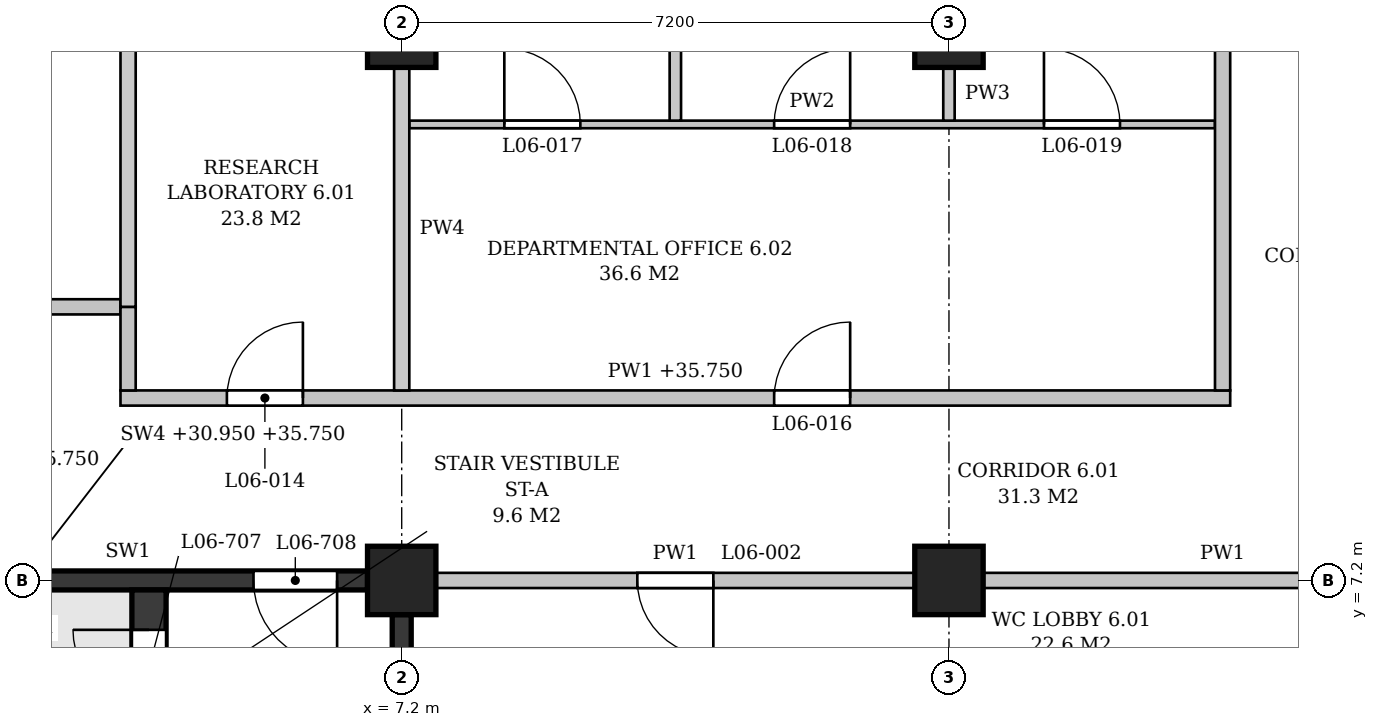
"""IFC4 building model, lengths in metres.
Left out: names, types, materials, properties, quantities, classifications, styles, units other than length and angle.
Written with IfcOpenShell. Run it as: python <this file> out.ifc"""

import sys

from ifc_helpers import new_model, si_unit, direction, frame, frame_2d, origin, origin_2d, place, context, subcontext, project, spatial, polyline, rectangle, outline, extrude, element, fill, save


model = new_model("IFC4")
c1 = context("Model", 3, precision=1e-05, world=origin(), true_north=direction((0.0, 1.0)))
c2 = subcontext(c1, "Body", "Model", "MODEL_VIEW")
j1 = project(units=[si_unit("LENGTHUNIT", "METRE"), si_unit("PLANEANGLEUNIT", "RADIAN")], contexts=[c1])
p1 = place(None, origin())
s1 = spatial("IfcSite", under=j1, at=p1, CompositionType="ELEMENT")
p2 = place(p1, origin())
s2 = spatial("IfcBuilding", under=s1, at=p2, CompositionType="ELEMENT")
p3 = place(p2, frame((0.0, 0.0, 31.2)))
s3 = spatial("IfcBuildingStorey", under=s2, at=p3, CompositionType="ELEMENT", Elevation=31.2)
for number, where, z_axis, x_axis in (
    (1, (7.2, 7.2, 0.0), (0.0, 0.0, 1.0), (1.0, 0.0, 0.0)),
    (2, (7.2, 14.4, 0.0), (0.0, 0.0, 1.0), (1.0, 0.0, 0.0)),
    (3, (14.4, 7.2, 0.0), (0.0, 0.0, 1.0), (1.0, 0.0, 0.0)),
    (4, (14.4, 14.4, 0.0), (0.0, 0.0, 1.0), (1.0, 0.0, 0.0)),
):
    element("IfcColumn", number, at=place(p3, frame(where, z_axis=z_axis, x_axis=x_axis)), inside=s3, PredefinedType="COLUMN", context=c2, shape_type="SweptSolid", body=[
        extrude(rectangle(XDim=0.9, YDim=0.9, at=origin_2d()), origin(), (0.0, 0.0, 1.0), 4.8),
    ])
p4 = place(p3, frame((0.45, 7.2, 0.0), z_axis=(0.0, 0.0, 1.0), x_axis=(1.0, 0.0, 0.0)))
e5 = element("IfcWall", 5, at=p4, inside=s3, PredefinedType="SHEAR", context=c2, shape_type="SweptSolid", body=[
    extrude(rectangle(XDim=6.3, YDim=0.25, at=frame_2d((3.15, 0.0))), origin(), (0.0, 0.0, 1.0), 3.8),
])
p5 = place(p4, frame((4.8, 0.0, 0.0)))
e6 = element("IfcOpeningElement", 6, at=p5, cuts=e5, PredefinedType="OPENING", context=c2, shape_type="SweptSolid", body=[
    extrude(rectangle(XDim=1.1, YDim=2.1, at=frame_2d((0.55, 1.05))), frame((0.0, 0.135, 0.0), z_axis=(0.0, -1.0, 0.0), x_axis=(1.0, 0.0, 0.0)), (0.0, 0.0, 1.0), 0.27),
])
p6 = place(p3, frame((7.2, 0.45, 0.0), z_axis=(0.0, 0.0, 1.0), x_axis=(0.0, 1.0, 0.0)))
e7 = element("IfcWall", 7, at=p6, inside=s3, PredefinedType="SHEAR", context=c2, shape_type="SweptSolid", body=[
    extrude(rectangle(XDim=6.3, YDim=0.25, at=frame_2d((3.15, 0.0))), origin(), (0.0, 0.0, 1.0), 3.8),
])
p7 = place(p3, frame((3.875, 0.225, 0.0), z_axis=(0.0, 0.0, 1.0), x_axis=(0.0, 1.0, 0.0)))
e8 = element("IfcWall", 8, at=p7, inside=s3, PredefinedType="SHEAR", context=c2, shape_type="SweptSolid", body=[
    extrude(rectangle(XDim=6.85, YDim=0.45, at=frame_2d((3.425, 0.0))), origin(), (0.0, 0.0, 1.0), 4.55),
])
p8 = place(p7, frame((5.325, 0.0, 0.0)))
e9 = element("IfcOpeningElement", 9, at=p8, cuts=e8, PredefinedType="OPENING", context=c2, shape_type="SweptSolid", body=[
    extrude(rectangle(XDim=1.0, YDim=2.1, at=frame_2d((0.5, 1.05))), frame((0.0, 0.235, 0.0), z_axis=(0.0, -1.0, 0.0), x_axis=(1.0, 0.0, 0.0)), (0.0, 0.0, 1.0), 0.47),
])
p9 = place(p3, frame((7.65, 7.2, 0.0), z_axis=(0.0, 0.0, 1.0), x_axis=(1.0, 0.0, 0.0)))
e10 = element("IfcWall", 10, at=p9, inside=s3, PredefinedType="PARTITIONING", context=c2, shape_type="SweptSolid", body=[
    extrude(rectangle(XDim=6.3, YDim=0.2, at=frame_2d((3.15, 0.0))), origin(), (0.0, 0.0, 1.0), 3.8),
])
p10 = place(p9, frame((2.65, 0.0, 0.0)))
e11 = element("IfcOpeningElement", 11, at=p10, cuts=e10, PredefinedType="OPENING", context=c2, shape_type="SweptSolid", body=[
    extrude(rectangle(XDim=1.0, YDim=2.1, at=frame_2d((0.5, 1.05))), frame((0.0, 0.11, 0.0), z_axis=(0.0, -1.0, 0.0), x_axis=(1.0, 0.0, 0.0)), (0.0, 0.0, 1.0), 0.22),
])
p11 = place(p3, frame((14.85, 7.2, 0.0), z_axis=(0.0, 0.0, 1.0), x_axis=(1.0, 0.0, 0.0)))
e12 = element("IfcWall", 12, at=p11, inside=s3, PredefinedType="PARTITIONING", context=c2, shape_type="SweptSolid", body=[
    extrude(rectangle(XDim=6.3, YDim=0.2, at=frame_2d((3.15, 0.0))), origin(), (0.0, 0.0, 1.0), 3.8),
])
p12 = place(p11, frame((4.225, 0.0, 0.0)))
e13 = element("IfcOpeningElement", 13, at=p12, cuts=e12, PredefinedType="OPENING", context=c2, shape_type="SweptSolid", body=[
    extrude(rectangle(XDim=1.0, YDim=2.1, at=frame_2d((0.5, 1.05))), frame((0.0, 0.11, 0.0), z_axis=(0.0, -1.0, 0.0), x_axis=(1.0, 0.0, 0.0)), (0.0, 0.0, 1.0), 0.22),
])
p13 = place(p3, frame((3.5, 9.6, 0.0), z_axis=(0.0, 0.0, 1.0), x_axis=(1.0, 0.0, 0.0)))
e14 = element("IfcWall", 14, at=p13, inside=s3, PredefinedType="PARTITIONING", context=c2, shape_type="SweptSolid", body=[
    extrude(outline(polyline([(0.0, 0.0), (14.6, 0.0), (14.6, 4.55), (11.15, 4.55), (11.15, 3.8), (10.65, 3.8), (10.65, 4.55), (3.95, 4.55), (3.95, 3.8), (3.45, 3.8), (3.45, 4.55), (0.0, 4.55), (0.0, 0.0)])), frame((0.0, 0.1, 0.0), z_axis=(0.0, -1.0, 0.0), x_axis=(1.0, 0.0, 0.0)), (0.0, 0.0, 1.0), 0.2),
])
p14 = place(p13, frame((1.4, 0.0, 0.0)))
e15 = element("IfcOpeningElement", 15, at=p14, cuts=e14, PredefinedType="OPENING", context=c2, shape_type="SweptSolid", body=[
    extrude(rectangle(XDim=1.0, YDim=2.1, at=frame_2d((0.5, 1.05))), frame((0.0, 0.11, 0.0), z_axis=(0.0, -1.0, 0.0), x_axis=(1.0, 0.0, 0.0)), (0.0, 0.0, 1.0), 0.22),
])
p15 = place(p13, frame((8.6, 0.0, 0.0)))
e16 = element("IfcOpeningElement", 16, at=p15, cuts=e14, PredefinedType="OPENING", context=c2, shape_type="SweptSolid", body=[
    extrude(rectangle(XDim=1.0, YDim=2.1, at=frame_2d((0.5, 1.05))), frame((0.0, 0.11, 0.0), z_axis=(0.0, -1.0, 0.0), x_axis=(1.0, 0.0, 0.0)), (0.0, 0.0, 1.0), 0.22),
])
p16 = place(p3, frame((0.15, 10.8, 0.0), z_axis=(0.0, 0.0, 1.0), x_axis=(1.0, 0.0, 0.0)))
e17 = element("IfcWall", 17, at=p16, inside=s3, PredefinedType="PARTITIONING", context=c2, shape_type="SweptSolid", body=[
    extrude(outline(polyline([(0.0, 0.0), (3.35, 0.0), (3.35, 4.55), (0.1, 4.55), (0.1, 3.95), (0.0, 3.95), (0.0, 0.0)])), frame((0.0, 0.1, 0.0), z_axis=(0.0, -1.0, 0.0), x_axis=(1.0, 0.0, 0.0)), (0.0, 0.0, 1.0), 0.2),
])
p17 = place(p16, frame((1.175, 0.0, 0.0)))
e18 = element("IfcOpeningElement", 18, at=p17, cuts=e17, PredefinedType="OPENING", context=c2, shape_type="SweptSolid", body=[
    extrude(rectangle(XDim=1.0, YDim=2.1, at=frame_2d((0.5, 1.05))), frame((0.0, 0.11, 0.0), z_axis=(0.0, -1.0, 0.0), x_axis=(1.0, 0.0, 0.0)), (0.0, 0.0, 1.0), 0.22),
])
p18 = place(p3, frame((7.3, 13.2, 0.0), z_axis=(0.0, 0.0, 1.0), x_axis=(1.0, 0.0, 0.0)))
e19 = element("IfcWall", 19, at=p18, inside=s3, PredefinedType="PARTITIONING", context=c2, shape_type="SweptSolid", body=[
    extrude(rectangle(XDim=10.6, YDim=0.1, at=frame_2d((5.3, 0.0))), origin(), (0.0, 0.0, 1.0), 3.8),
])
p19 = place(p18, frame((1.25, 0.0, 0.0)))
e20 = element("IfcOpeningElement", 20, at=p19, cuts=e19, PredefinedType="OPENING", context=c2, shape_type="SweptSolid", body=[
    extrude(rectangle(XDim=1.0, YDim=2.1, at=frame_2d((0.5, 1.05))), frame((0.0, 0.06, 0.0), z_axis=(0.0, -1.0, 0.0), x_axis=(1.0, 0.0, 0.0)), (0.0, 0.0, 1.0), 0.12),
])
p20 = place(p18, frame((4.8, 0.0, 0.0)))
e21 = element("IfcOpeningElement", 21, at=p20, cuts=e19, PredefinedType="OPENING", context=c2, shape_type="SweptSolid", body=[
    extrude(rectangle(XDim=1.0, YDim=2.1, at=frame_2d((0.5, 1.05))), frame((0.0, 0.06, 0.0), z_axis=(0.0, -1.0, 0.0), x_axis=(1.0, 0.0, 0.0)), (0.0, 0.0, 1.0), 0.12),
])
p21 = place(p18, frame((8.35, 0.0, 0.0)))
e22 = element("IfcOpeningElement", 22, at=p21, cuts=e19, PredefinedType="OPENING", context=c2, shape_type="SweptSolid", body=[
    extrude(rectangle(XDim=1.0, YDim=2.1, at=frame_2d((0.5, 1.05))), frame((0.0, 0.06, 0.0), z_axis=(0.0, -1.0, 0.0), x_axis=(1.0, 0.0, 0.0)), (0.0, 0.0, 1.0), 0.12),
])
p22 = place(p3, frame((3.6, 9.7, 0.0), z_axis=(0.0, 0.0, 1.0), x_axis=(0.0, 1.0, 0.0)))
e23 = element("IfcWall", 23, at=p22, inside=s3, PredefinedType="PARTITIONING", context=c2, shape_type="SweptSolid", body=[
    extrude(rectangle(XDim=1.1, YDim=0.2, at=frame_2d((0.55, 0.0))), origin(), (0.0, 0.0, 1.0), 4.55),
])
p23 = place(p3, frame((3.6, 10.8, 0.0), z_axis=(0.0, 0.0, 1.0), x_axis=(0.0, 1.0, 0.0)))
e24 = element("IfcWall", 24, at=p23, inside=s3, PredefinedType="PARTITIONING", context=c2, shape_type="SweptSolid", body=[
    extrude(outline(polyline([(0.0, 0.0), (10.65, 0.0), (10.65, 3.95), (10.55, 3.95), (10.55, 4.55), (3.85, 4.55), (3.85, 3.8), (3.35, 3.8), (3.35, 4.55), (0.0, 4.55), (0.0, 0.0)])), frame((0.0, 0.1, 0.0), z_axis=(0.0, -1.0, 0.0), x_axis=(1.0, 0.0, 0.0)), (0.0, 0.0, 1.0), 0.2),
])
p24 = place(p3, frame((7.2, 9.7, 0.0), z_axis=(0.0, 0.0, 1.0), x_axis=(0.0, 1.0, 0.0)))
e25 = element("IfcWall", 25, at=p24, inside=s3, PredefinedType="PARTITIONING", context=c2, shape_type="SweptSolid", body=[
    extrude(rectangle(XDim=4.25, YDim=0.2, at=frame_2d((2.125, 0.0))), origin(), (0.0, 0.0, 1.0), 3.8),
])
p25 = place(p3, frame((10.8, 13.25, 0.0), z_axis=(0.0, 0.0, 1.0), x_axis=(0.0, 1.0, 0.0)))
e26 = element("IfcWall", 26, at=p25, inside=s3, PredefinedType="PARTITIONING", context=c2, shape_type="SweptSolid", body=[
    extrude(rectangle(XDim=8.2, YDim=0.15, at=frame_2d((4.1, 0.0))), origin(), (0.0, 0.0, 1.0), 3.8),
])
p26 = place(p3, frame((14.4, 13.25, 0.0), z_axis=(0.0, 0.0, 1.0), x_axis=(0.0, 1.0, 0.0)))
e27 = element("IfcWall", 27, at=p26, inside=s3, PredefinedType="PARTITIONING", context=c2, shape_type="SweptSolid", body=[
    extrude(rectangle(XDim=0.7, YDim=0.15, at=frame_2d((0.35, 0.0))), origin(), (0.0, 0.0, 1.0), 3.8),
])
p27 = place(p3, frame((18.0, 9.7, 0.0), z_axis=(0.0, 0.0, 1.0), x_axis=(0.0, 1.0, 0.0)))
e28 = element("IfcWall", 28, at=p27, inside=s3, PredefinedType="PARTITIONING", context=c2, shape_type="SweptSolid", body=[
    extrude(outline(polyline([(0.0, 0.0), (7.1, 0.0), (7.1, 4.55), (4.95, 4.55), (4.95, 3.8), (4.45, 3.8), (4.45, 4.55), (0.0, 4.55), (0.0, 0.0)])), frame((0.0, 0.1, 0.0), z_axis=(0.0, -1.0, 0.0), x_axis=(1.0, 0.0, 0.0)), (0.0, 0.0, 1.0), 0.2),
])
p28 = place(p8, origin())
e29 = element("IfcDoor", 29, at=p28, inside=s3, OperationType="SINGLE_SWING_RIGHT", PredefinedType="DOOR", context=c2, shape_type="SweptSolid", body=[
    extrude(rectangle(XDim=1.0, YDim=2.1, at=frame_2d((0.5, 1.05))), frame((0.0, 0.025, 0.0), z_axis=(0.0, -1.0, 0.0), x_axis=(1.0, 0.0, 0.0)), (0.0, 0.0, 1.0), 0.05),
])
fill(e9, e29)
p29 = place(p5, frame((1.1, 0.0, 0.0), z_axis=(0.0, 0.0, 1.0), x_axis=(-1.0, 0.0, 0.0)))
e30 = element("IfcDoor", 30, at=p29, inside=s3, OperationType="SINGLE_SWING_LEFT", PredefinedType="DOOR", context=c2, shape_type="SweptSolid", body=[
    extrude(rectangle(XDim=1.1, YDim=2.1, at=frame_2d((0.55, 1.05))), frame((0.0, 0.025, 0.0), z_axis=(0.0, -1.0, 0.0), x_axis=(1.0, 0.0, 0.0)), (0.0, 0.0, 1.0), 0.05),
])
fill(e6, e30)
p30 = place(p10, frame((1.0, 0.0, 0.0), z_axis=(0.0, 0.0, 1.0), x_axis=(-1.0, 0.0, 0.0)))
e31 = element("IfcDoor", 31, at=p30, inside=s3, OperationType="SINGLE_SWING_LEFT", PredefinedType="DOOR", context=c2, shape_type="SweptSolid", body=[
    extrude(rectangle(XDim=1.0, YDim=2.1, at=frame_2d((0.5, 1.05))), frame((0.0, 0.025, 0.0), z_axis=(0.0, -1.0, 0.0), x_axis=(1.0, 0.0, 0.0)), (0.0, 0.0, 1.0), 0.05),
])
fill(e11, e31)
p31 = place(p14, origin())
e32 = element("IfcDoor", 32, at=p31, inside=s3, OperationType="SINGLE_SWING_RIGHT", PredefinedType="DOOR", context=c2, shape_type="SweptSolid", body=[
    extrude(rectangle(XDim=1.0, YDim=2.1, at=frame_2d((0.5, 1.05))), frame((0.0, 0.025, 0.0), z_axis=(0.0, -1.0, 0.0), x_axis=(1.0, 0.0, 0.0)), (0.0, 0.0, 1.0), 0.05),
])
fill(e15, e32)
p32 = place(p15, origin())
e33 = element("IfcDoor", 33, at=p32, inside=s3, OperationType="SINGLE_SWING_RIGHT", PredefinedType="DOOR", context=c2, shape_type="SweptSolid", body=[
    extrude(rectangle(XDim=1.0, YDim=2.1, at=frame_2d((0.5, 1.05))), frame((0.0, 0.025, 0.0), z_axis=(0.0, -1.0, 0.0), x_axis=(1.0, 0.0, 0.0)), (0.0, 0.0, 1.0), 0.05),
])
fill(e16, e33)
p33 = place(p19, origin())
e34 = element("IfcDoor", 34, at=p33, inside=s3, OperationType="SINGLE_SWING_LEFT", PredefinedType="DOOR", context=c2, shape_type="SweptSolid", body=[
    extrude(rectangle(XDim=1.0, YDim=2.1, at=frame_2d((0.5, 1.05))), frame((0.0, 0.025, 0.0), z_axis=(0.0, -1.0, 0.0), x_axis=(1.0, 0.0, 0.0)), (0.0, 0.0, 1.0), 0.05),
])
fill(e20, e34)
p34 = place(p20, origin())
e35 = element("IfcDoor", 35, at=p34, inside=s3, OperationType="SINGLE_SWING_RIGHT", PredefinedType="DOOR", context=c2, shape_type="SweptSolid", body=[
    extrude(rectangle(XDim=1.0, YDim=2.1, at=frame_2d((0.5, 1.05))), frame((0.0, 0.025, 0.0), z_axis=(0.0, -1.0, 0.0), x_axis=(1.0, 0.0, 0.0)), (0.0, 0.0, 1.0), 0.05),
])
fill(e21, e35)
p35 = place(p21, origin())
e36 = element("IfcDoor", 36, at=p35, inside=s3, OperationType="SINGLE_SWING_LEFT", PredefinedType="DOOR", context=c2, shape_type="SweptSolid", body=[
    extrude(rectangle(XDim=1.0, YDim=2.1, at=frame_2d((0.5, 1.05))), frame((0.0, 0.025, 0.0), z_axis=(0.0, -1.0, 0.0), x_axis=(1.0, 0.0, 0.0)), (0.0, 0.0, 1.0), 0.05),
])
fill(e22, e36)
save(model, sys.argv[1])
